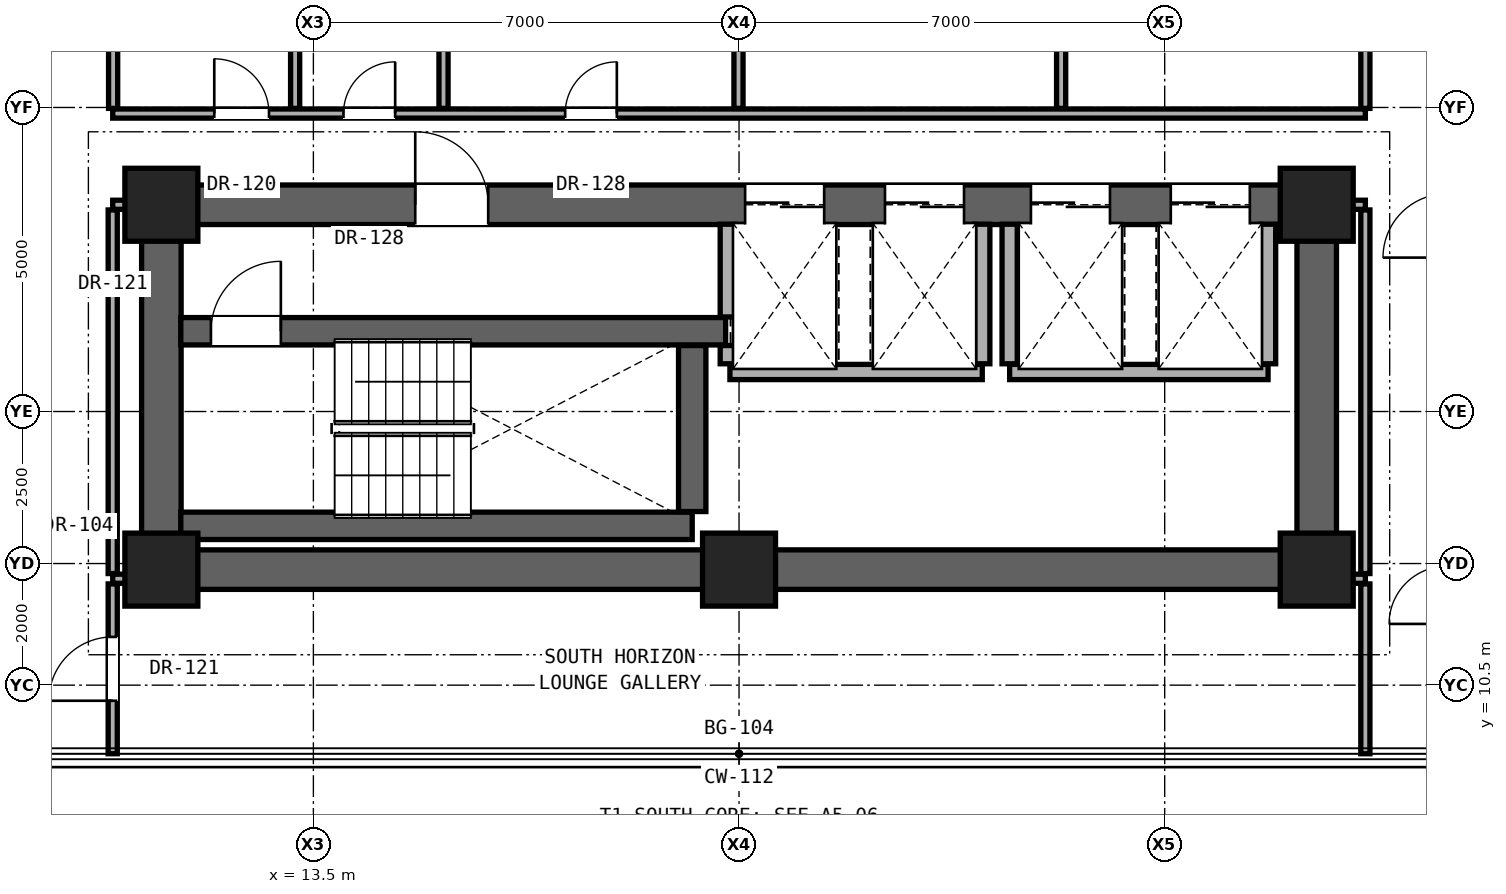
"""IFC4 building model, lengths in metres.
Left out: names, types, materials, properties, quantities, classifications, styles, units other than length and angle.
Written with IfcOpenShell. Run it as: python <this file> out.ifc"""

import sys

from ifc_helpers import new_model, si_unit, direction, frame, frame_2d, origin, origin_2d, place, context, subcontext, project, spatial, rectangle, extrude, element, fill, save


model = new_model("IFC4")
c1 = context("Model", 3, precision=1e-05, world=origin(), true_north=direction((0.0, 1.0)))
c2 = subcontext(c1, "Body", "Model", "MODEL_VIEW")
j1 = project(units=[si_unit("LENGTHUNIT", "METRE"), si_unit("PLANEANGLEUNIT", "RADIAN")], contexts=[c1])
p1 = place(None, origin())
s1 = spatial("IfcSite", under=j1, at=p1, CompositionType="ELEMENT")
p2 = place(p1, origin())
s2 = spatial("IfcBuilding", under=s1, at=p2, CompositionType="ELEMENT")
p3 = place(p2, frame((0.0, 0.0, 91.7)))
s3 = spatial("IfcBuildingStorey", under=s2, at=p3, CompositionType="ELEMENT", Elevation=91.7)
for number, where, z_axis, x_axis in (
    (1, (11.0, 12.4, 0.0), (0.0, 0.0, 1.0), (1.0, 0.0, 0.0)),
    (2, (20.5, 12.4, 0.0), (0.0, 0.0, 1.0), (1.0, 0.0, 0.0)),
    (3, (30.0, 12.4, 0.0), (0.0, 0.0, 1.0), (1.0, 0.0, 0.0)),
    (4, (11.0, 18.4, 0.0), (0.0, 0.0, 1.0), (1.0, 0.0, 0.0)),
    (5, (30.0, 18.4, 0.0), (0.0, 0.0, 1.0), (1.0, 0.0, 0.0)),
):
    element("IfcColumn", number, at=place(p3, frame(where, z_axis=z_axis, x_axis=x_axis)), inside=s3, PredefinedType="COLUMN", context=c2, shape_type="SweptSolid", body=[
        extrude(rectangle(XDim=1.2, YDim=1.2, at=origin_2d()), origin(), (0.0, 0.0, 1.0), 3.3),
    ])
p4 = place(p3, frame((11.0, 12.4, 0.0), z_axis=(0.0, 0.0, 1.0), x_axis=(1.0, 0.0, 0.0)))
e6 = element("IfcWall", 6, at=p4, inside=s3, PredefinedType="SHEAR", context=c2, shape_type="SweptSolid", body=[
    extrude(rectangle(XDim=19.0, YDim=0.65, at=frame_2d((9.5, 0.0))), origin(), (0.0, 0.0, 1.0), 3.08),
])
for number, where, z_axis, x_axis in (
    (7, (11.0, 12.4, 0.0), (0.0, 0.0, 1.0), (0.0, 1.0, 0.0)),
    (8, (30.0, 12.4, 0.0), (0.0, 0.0, 1.0), (0.0, 1.0, 0.0)),
):
    element("IfcWall", number, at=place(p3, frame(where, z_axis=z_axis, x_axis=x_axis)), inside=s3, PredefinedType="SHEAR", context=c2, shape_type="SweptSolid", body=[
        extrude(rectangle(XDim=6.0, YDim=0.65, at=frame_2d((3.0, 0.0))), origin(), (0.0, 0.0, 1.0), 3.08),
    ])
p5 = place(p3, frame((11.0, 18.4, 0.0), z_axis=(0.0, 0.0, 1.0), x_axis=(1.0, 0.0, 0.0)))
e9 = element("IfcWall", 9, at=p5, inside=s3, PredefinedType="SHEAR", context=c2, shape_type="SweptSolid", body=[
    extrude(rectangle(XDim=19.0, YDim=0.65, at=frame_2d((9.5, 0.0))), origin(), (0.0, 0.0, 1.0), 3.08),
])
p6 = place(p5, frame((4.175, 0.0, 0.0)))
e10 = element("IfcOpeningElement", 10, at=p6, cuts=e9, PredefinedType="OPENING", context=c2, shape_type="SweptSolid", body=[
    extrude(rectangle(XDim=1.2, YDim=2.25, at=frame_2d((0.6, 1.125))), frame((0.0, 0.335, 0.0), z_axis=(0.0, -1.0, 0.0), x_axis=(1.0, 0.0, 0.0)), (0.0, 0.0, 1.0), 0.67),
])
p7 = place(p5, frame((9.6, 0.0, 0.0)))
e11 = element("IfcOpeningElement", 11, at=p7, cuts=e9, PredefinedType="OPENING", context=c2, shape_type="SweptSolid", body=[
    extrude(rectangle(XDim=1.3, YDim=2.3, at=frame_2d((0.65, 1.15))), frame((0.0, 0.335, 0.0), z_axis=(0.0, -1.0, 0.0), x_axis=(1.0, 0.0, 0.0)), (0.0, 0.0, 1.0), 0.67),
])
p8 = place(p5, frame((11.9, 0.0, 0.0)))
e12 = element("IfcOpeningElement", 12, at=p8, cuts=e9, PredefinedType="OPENING", context=c2, shape_type="SweptSolid", body=[
    extrude(rectangle(XDim=1.3, YDim=2.3, at=frame_2d((0.65, 1.15))), frame((0.0, 0.335, 0.0), z_axis=(0.0, -1.0, 0.0), x_axis=(1.0, 0.0, 0.0)), (0.0, 0.0, 1.0), 0.67),
])
p9 = place(p5, frame((14.3, 0.0, 0.0)))
e13 = element("IfcOpeningElement", 13, at=p9, cuts=e9, PredefinedType="OPENING", context=c2, shape_type="SweptSolid", body=[
    extrude(rectangle(XDim=1.3, YDim=2.3, at=frame_2d((0.65, 1.15))), frame((0.0, 0.335, 0.0), z_axis=(0.0, -1.0, 0.0), x_axis=(1.0, 0.0, 0.0)), (0.0, 0.0, 1.0), 0.67),
])
p10 = place(p5, frame((16.6, 0.0, 0.0)))
e14 = element("IfcOpeningElement", 14, at=p10, cuts=e9, PredefinedType="OPENING", context=c2, shape_type="SweptSolid", body=[
    extrude(rectangle(XDim=1.3, YDim=2.3, at=frame_2d((0.65, 1.15))), frame((0.0, 0.335, 0.0), z_axis=(0.0, -1.0, 0.0), x_axis=(1.0, 0.0, 0.0)), (0.0, 0.0, 1.0), 0.67),
])
for number, where, z_axis, x_axis in (
    (15, (10.2, 12.25, 0.0), (0.0, 0.0, 1.0), (1.0, 0.0, 0.0)),
    (16, (30.32, 12.25, 0.0), (0.0, 0.0, 1.0), (1.0, 0.0, 0.0)),
):
    element("IfcWall", number, at=place(p3, frame(where, z_axis=z_axis, x_axis=x_axis)), inside=s3, PredefinedType="PARTITIONING", context=c2, shape_type="SweptSolid", body=[
        extrude(rectangle(XDim=0.48, YDim=0.15, at=frame_2d((0.24, 0.0))), origin(), (0.0, 0.0, 1.0), 3.08),
    ])
p11 = place(p3, frame((11.32, 13.12, 0.0), z_axis=(0.0, 0.0, 1.0), x_axis=(1.0, 0.0, 0.0)))
e17 = element("IfcWall", 17, at=p11, inside=s3, PredefinedType="SHEAR", context=c2, shape_type="SweptSolid", body=[
    extrude(rectangle(XDim=8.41, YDim=0.45, at=frame_2d((4.205, 0.0))), origin(), (0.0, 0.0, 1.0), 3.08),
])
p12 = place(p3, frame((20.35, 15.65, 0.0), z_axis=(0.0, 0.0, 1.0), x_axis=(1.0, 0.0, 0.0)))
e18 = element("IfcWall", 18, at=p12, inside=s3, PredefinedType="SOLIDWALL", context=c2, shape_type="SweptSolid", body=[
    extrude(rectangle(XDim=4.15, YDim=0.25, at=frame_2d((2.075, 0.0))), origin(), (0.0, 0.0, 1.0), 3.08),
])
p13 = place(p3, frame((24.95, 15.65, 0.0), z_axis=(0.0, 0.0, 1.0), x_axis=(1.0, 0.0, 0.0)))
e19 = element("IfcWall", 19, at=p13, inside=s3, PredefinedType="SOLIDWALL", context=c2, shape_type="SweptSolid", body=[
    extrude(rectangle(XDim=4.25, YDim=0.25, at=frame_2d((2.125, 0.0))), origin(), (0.0, 0.0, 1.0), 3.08),
])
p14 = place(p3, frame((11.32, 16.32, 0.0), z_axis=(0.0, 0.0, 1.0), x_axis=(1.0, 0.0, 0.0)))
e20 = element("IfcWall", 20, at=p14, inside=s3, PredefinedType="SHEAR", context=c2, shape_type="SweptSolid", body=[
    extrude(rectangle(XDim=8.96, YDim=0.45, at=frame_2d((4.48, 0.0))), origin(), (0.0, 0.0, 1.0), 3.08),
])
p15 = place(p14, frame((0.495, 0.0, 0.0)))
e21 = element("IfcOpeningElement", 21, at=p15, cuts=e20, PredefinedType="OPENING", context=c2, shape_type="SweptSolid", body=[
    extrude(rectangle(XDim=1.15, YDim=2.2, at=frame_2d((0.575, 1.1))), frame((0.0, 0.235, 0.0), z_axis=(0.0, -1.0, 0.0), x_axis=(1.0, 0.0, 0.0)), (0.0, 0.0, 1.0), 0.47),
])
for number, where, z_axis, x_axis in (
    (22, (10.2, 18.4, 0.0), (0.0, 0.0, 1.0), (1.0, 0.0, 0.0)),
    (23, (30.32, 18.4, 0.0), (0.0, 0.0, 1.0), (1.0, 0.0, 0.0)),
):
    element("IfcWall", number, at=place(p3, frame(where, z_axis=z_axis, x_axis=x_axis)), inside=s3, PredefinedType="PARTITIONING", context=c2, shape_type="SweptSolid", body=[
        extrude(rectangle(XDim=0.48, YDim=0.15, at=frame_2d((0.24, 0.0))), origin(), (0.0, 0.0, 1.0), 2.456),
    ])
p16 = place(p3, frame((10.2, 19.9, 0.0), z_axis=(0.0, 0.0, 1.0), x_axis=(1.0, 0.0, 0.0)))
e24 = element("IfcWall", 24, at=p16, inside=s3, PredefinedType="PARTITIONING", context=c2, shape_type="SweptSolid", body=[
    extrude(rectangle(XDim=20.6, YDim=0.15, at=frame_2d((10.3, 0.0))), origin(), (0.0, 0.0, 1.0), 2.124),
])
p17 = place(p16, frame((1.67, 0.0, 0.0)))
e25 = element("IfcOpeningElement", 25, at=p17, cuts=e24, PredefinedType="OPENING", context=c2, shape_type="SweptSolid", body=[
    extrude(rectangle(XDim=0.9, YDim=2.1, at=frame_2d((0.45, 1.05))), frame((0.0, 0.085, 0.0), z_axis=(0.0, -1.0, 0.0), x_axis=(1.0, 0.0, 0.0)), (0.0, 0.0, 1.0), 0.17),
])
p18 = place(p16, frame((3.795, 0.0, 0.0)))
e26 = element("IfcOpeningElement", 26, at=p18, cuts=e24, PredefinedType="OPENING", context=c2, shape_type="SweptSolid", body=[
    extrude(rectangle(XDim=0.85, YDim=2.01, at=frame_2d((0.425, 1.005))), frame((0.0, 0.085, 0.0), z_axis=(0.0, -1.0, 0.0), x_axis=(1.0, 0.0, 0.0)), (0.0, 0.0, 1.0), 0.17),
])
p19 = place(p16, frame((7.44, 0.0, 0.0)))
e27 = element("IfcOpeningElement", 27, at=p19, cuts=e24, PredefinedType="OPENING", context=c2, shape_type="SweptSolid", body=[
    extrude(rectangle(XDim=0.85, YDim=2.01, at=frame_2d((0.425, 1.005))), frame((0.0, 0.085, 0.0), z_axis=(0.0, -1.0, 0.0), x_axis=(1.0, 0.0, 0.0)), (0.0, 0.0, 1.0), 0.17),
])
p20 = place(p3, frame((10.2, 9.372, 0.0), z_axis=(0.0, 0.0, 1.0), x_axis=(0.0, 1.0, 0.0)))
e28 = element("IfcWall", 28, at=p20, inside=s3, PredefinedType="PARTITIONING", context=c2, shape_type="SweptSolid", body=[
    extrude(rectangle(XDim=2.793, YDim=0.15, at=frame_2d((1.396, 0.0))), origin(), (0.0, 0.0, 1.0), 3.08),
])
p21 = place(p20, frame((0.872, 0.0, 0.0)))
e29 = element("IfcOpeningElement", 29, at=p21, cuts=e28, PredefinedType="OPENING", context=c2, shape_type="SweptSolid", body=[
    extrude(rectangle(XDim=1.05, YDim=2.2, at=frame_2d((0.525, 1.1))), frame((0.0, 0.085, 0.0), z_axis=(0.0, -1.0, 0.0), x_axis=(1.0, 0.0, 0.0)), (0.0, 0.0, 1.0), 0.17),
])
p22 = place(p3, frame((10.2, 12.335, 0.0), z_axis=(0.0, 0.0, 1.0), x_axis=(0.0, 1.0, 0.0)))
e30 = element("IfcWall", 30, at=p22, inside=s3, PredefinedType="PARTITIONING", context=c2, shape_type="SweptSolid", body=[
    extrude(rectangle(XDim=5.98, YDim=0.15, at=frame_2d((2.99, 0.0))), origin(), (0.0, 0.0, 1.0), 2.456),
])
for number, where, z_axis, x_axis in (
    (31, (10.207, 19.985, 0.0), (0.0, 0.0, 1.0), (0.0, 1.0, 0.0)),
    (32, (13.2, 19.985, 0.0), (0.0, 0.0, 1.0), (0.0, 1.0, 0.0)),
):
    element("IfcWall", number, at=place(p3, frame(where, z_axis=z_axis, x_axis=x_axis)), inside=s3, PredefinedType="PARTITIONING", context=c2, shape_type="SweptSolid", body=[
        extrude(rectangle(XDim=2.78, YDim=0.15, at=frame_2d((1.39, 0.0))), origin(), (0.0, 0.0, 1.0), 3.08),
    ])
p23 = place(p3, frame((15.64, 19.985, 0.0), z_axis=(0.0, 0.0, 1.0), x_axis=(0.0, 1.0, 0.0)))
e33 = element("IfcWall", 33, at=p23, inside=s3, PredefinedType="PARTITIONING", context=c2, shape_type="SweptSolid", body=[
    extrude(rectangle(XDim=2.78, YDim=0.15, at=frame_2d((1.39, 0.0))), origin(), (0.0, 0.0, 1.0), 2.609),
])
p24 = place(p3, frame((19.73, 13.355, 0.0), z_axis=(0.0, 0.0, 1.0), x_axis=(0.0, 1.0, 0.0)))
e34 = element("IfcWall", 34, at=p24, inside=s3, PredefinedType="SHEAR", context=c2, shape_type="SweptSolid", body=[
    extrude(rectangle(XDim=2.73, YDim=0.45, at=frame_2d((1.365, 0.0))), origin(), (0.0, 0.0, 1.0), 3.08),
])
p25 = place(p3, frame((20.315, 15.785, 0.0), z_axis=(0.0, 0.0, 1.0), x_axis=(0.0, 1.0, 0.0)))
e35 = element("IfcWall", 35, at=p25, inside=s3, PredefinedType="SOLIDWALL", context=c2, shape_type="SweptSolid", body=[
    extrude(rectangle(XDim=0.3, YDim=0.25, at=frame_2d((0.15, 0.0))), origin(), (0.0, 0.0, 1.0), 3.08),
])
p26 = place(p3, frame((20.315, 16.555, 0.0), z_axis=(0.0, 0.0, 1.0), x_axis=(0.0, 1.0, 0.0)))
e36 = element("IfcWall", 36, at=p26, inside=s3, PredefinedType="SOLIDWALL", context=c2, shape_type="SweptSolid", body=[
    extrude(rectangle(XDim=1.525, YDim=0.25, at=frame_2d((0.763, 0.0))), origin(), (0.0, 0.0, 1.0), 3.08),
])
p27 = place(p3, frame((20.491, 19.985, 0.0), z_axis=(0.0, 0.0, 1.0), x_axis=(0.0, 1.0, 0.0)))
e37 = element("IfcWall", 37, at=p27, inside=s3, PredefinedType="PARTITIONING", context=c2, shape_type="SweptSolid", body=[
    extrude(rectangle(XDim=13.03, YDim=0.15, at=frame_2d((6.515, 0.0))), origin(), (0.0, 0.0, 1.0), 2.124),
])
for number, where, z_axis, x_axis in (
    (38, (24.5, 15.785, 0.0), (0.0, 0.0, 1.0), (0.0, 1.0, 0.0)),
    (39, (24.95, 15.785, 0.0), (0.0, 0.0, 1.0), (0.0, 1.0, 0.0)),
):
    element("IfcWall", number, at=place(p3, frame(where, z_axis=z_axis, x_axis=x_axis)), inside=s3, PredefinedType="SOLIDWALL", context=c2, shape_type="SweptSolid", body=[
        extrude(rectangle(XDim=2.295, YDim=0.25, at=frame_2d((1.147, 0.0))), origin(), (0.0, 0.0, 1.0), 3.08),
    ])
p28 = place(p3, frame((25.797, 19.985, 0.0), z_axis=(0.0, 0.0, 1.0), x_axis=(0.0, 1.0, 0.0)))
e40 = element("IfcWall", 40, at=p28, inside=s3, PredefinedType="PARTITIONING", context=c2, shape_type="SweptSolid", body=[
    extrude(rectangle(XDim=13.03, YDim=0.15, at=frame_2d((6.515, 0.0))), origin(), (0.0, 0.0, 1.0), 2.124),
])
p29 = place(p3, frame((29.2, 15.785, 0.0), z_axis=(0.0, 0.0, 1.0), x_axis=(0.0, 1.0, 0.0)))
e41 = element("IfcWall", 41, at=p29, inside=s3, PredefinedType="SOLIDWALL", context=c2, shape_type="SweptSolid", body=[
    extrude(rectangle(XDim=2.295, YDim=0.25, at=frame_2d((1.147, 0.0))), origin(), (0.0, 0.0, 1.0), 3.08),
])
p30 = place(p3, frame((30.8, 9.372, 0.0), z_axis=(0.0, 0.0, 1.0), x_axis=(0.0, 1.0, 0.0)))
e42 = element("IfcWall", 42, at=p30, inside=s3, PredefinedType="PARTITIONING", context=c2, shape_type="SweptSolid", body=[
    extrude(rectangle(XDim=2.793, YDim=0.15, at=frame_2d((1.396, 0.0))), origin(), (0.0, 0.0, 1.0), 3.08),
])
p31 = place(p3, frame((30.8, 12.335, 0.0), z_axis=(0.0, 0.0, 1.0), x_axis=(0.0, 1.0, 0.0)))
e43 = element("IfcWall", 43, at=p31, inside=s3, PredefinedType="PARTITIONING", context=c2, shape_type="SweptSolid", body=[
    extrude(rectangle(XDim=5.98, YDim=0.15, at=frame_2d((2.99, 0.0))), origin(), (0.0, 0.0, 1.0), 2.456),
])
p32 = place(p3, frame((30.8, 19.985, 0.0), z_axis=(0.0, 0.0, 1.0), x_axis=(0.0, 1.0, 0.0)))
e44 = element("IfcWall", 44, at=p32, inside=s3, PredefinedType="PARTITIONING", context=c2, shape_type="SweptSolid", body=[
    extrude(rectangle(XDim=13.03, YDim=0.15, at=frame_2d((6.515, 0.0))), origin(), (0.0, 0.0, 1.0), 2.299),
])
p33 = place(p6, origin())
e45 = element("IfcDoor", 45, at=p33, inside=s3, OperationType="SINGLE_SWING_LEFT", PredefinedType="DOOR", context=c2, shape_type="SweptSolid", body=[
    extrude(rectangle(XDim=1.2, YDim=2.25, at=frame_2d((0.6, 1.125))), frame((0.0, 0.025, 0.0), z_axis=(0.0, -1.0, 0.0), x_axis=(1.0, 0.0, 0.0)), (0.0, 0.0, 1.0), 0.05),
])
fill(e10, e45)
p34 = place(p15, origin())
e46 = element("IfcDoor", 46, at=p34, inside=s3, OperationType="SINGLE_SWING_RIGHT", PredefinedType="DOOR", context=c2, shape_type="SweptSolid", body=[
    extrude(rectangle(XDim=1.15, YDim=2.2, at=frame_2d((0.575, 1.1))), frame((0.0, 0.025, 0.0), z_axis=(0.0, -1.0, 0.0), x_axis=(1.0, 0.0, 0.0)), (0.0, 0.0, 1.0), 0.05),
])
fill(e21, e46)
p35 = place(p17, origin())
e47 = element("IfcDoor", 47, at=p35, inside=s3, OperationType="SINGLE_SWING_LEFT", PredefinedType="DOOR", context=c2, shape_type="SweptSolid", body=[
    extrude(rectangle(XDim=0.9, YDim=2.1, at=frame_2d((0.45, 1.05))), frame((0.0, 0.025, 0.0), z_axis=(0.0, -1.0, 0.0), x_axis=(1.0, 0.0, 0.0)), (0.0, 0.0, 1.0), 0.05),
])
fill(e25, e47)
p36 = place(p18, origin())
e48 = element("IfcDoor", 48, at=p36, inside=s3, OperationType="SINGLE_SWING_RIGHT", PredefinedType="DOOR", context=c2, shape_type="SweptSolid", body=[
    extrude(rectangle(XDim=0.85, YDim=2.01, at=frame_2d((0.425, 1.005))), frame((0.0, 0.025, 0.0), z_axis=(0.0, -1.0, 0.0), x_axis=(1.0, 0.0, 0.0)), (0.0, 0.0, 1.0), 0.05),
])
fill(e26, e48)
p37 = place(p19, origin())
e49 = element("IfcDoor", 49, at=p37, inside=s3, OperationType="SINGLE_SWING_RIGHT", PredefinedType="DOOR", context=c2, shape_type="SweptSolid", body=[
    extrude(rectangle(XDim=0.85, YDim=2.01, at=frame_2d((0.425, 1.005))), frame((0.0, 0.025, 0.0), z_axis=(0.0, -1.0, 0.0), x_axis=(1.0, 0.0, 0.0)), (0.0, 0.0, 1.0), 0.05),
])
fill(e27, e49)
p38 = place(p21, origin())
e50 = element("IfcDoor", 50, at=p38, inside=s3, OperationType="SINGLE_SWING_LEFT", PredefinedType="DOOR", context=c2, shape_type="SweptSolid", body=[
    extrude(rectangle(XDim=1.05, YDim=2.2, at=frame_2d((0.525, 1.1))), frame((0.0, 0.025, 0.0), z_axis=(0.0, -1.0, 0.0), x_axis=(1.0, 0.0, 0.0)), (0.0, 0.0, 1.0), 0.05),
])
fill(e29, e50)
p39 = place(p7, origin())
e51 = element("IfcDoor", 51, at=p39, inside=s3, OperationType="DOUBLE_DOOR_SLIDING", PredefinedType="DOOR", context=c2, shape_type="SweptSolid", body=[
    extrude(rectangle(XDim=1.3, YDim=2.3, at=frame_2d((0.65, 1.15))), frame((0.0, 0.025, 0.0), z_axis=(0.0, -1.0, 0.0), x_axis=(1.0, 0.0, 0.0)), (0.0, 0.0, 1.0), 0.05),
])
fill(e11, e51)
p40 = place(p8, origin())
e52 = element("IfcDoor", 52, at=p40, inside=s3, OperationType="DOUBLE_DOOR_SLIDING", PredefinedType="DOOR", context=c2, shape_type="SweptSolid", body=[
    extrude(rectangle(XDim=1.3, YDim=2.3, at=frame_2d((0.65, 1.15))), frame((0.0, 0.025, 0.0), z_axis=(0.0, -1.0, 0.0), x_axis=(1.0, 0.0, 0.0)), (0.0, 0.0, 1.0), 0.05),
])
fill(e12, e52)
p41 = place(p9, origin())
e53 = element("IfcDoor", 53, at=p41, inside=s3, OperationType="DOUBLE_DOOR_SLIDING", PredefinedType="DOOR", context=c2, shape_type="SweptSolid", body=[
    extrude(rectangle(XDim=1.3, YDim=2.3, at=frame_2d((0.65, 1.15))), frame((0.0, 0.025, 0.0), z_axis=(0.0, -1.0, 0.0), x_axis=(1.0, 0.0, 0.0)), (0.0, 0.0, 1.0), 0.05),
])
fill(e13, e53)
p42 = place(p10, origin())
e54 = element("IfcDoor", 54, at=p42, inside=s3, OperationType="DOUBLE_DOOR_SLIDING", PredefinedType="DOOR", context=c2, shape_type="SweptSolid", body=[
    extrude(rectangle(XDim=1.3, YDim=2.3, at=frame_2d((0.65, 1.15))), frame((0.0, 0.025, 0.0), z_axis=(0.0, -1.0, 0.0), x_axis=(1.0, 0.0, 0.0)), (0.0, 0.0, 1.0), 0.05),
])
fill(e14, e54)
save(model, sys.argv[1])
